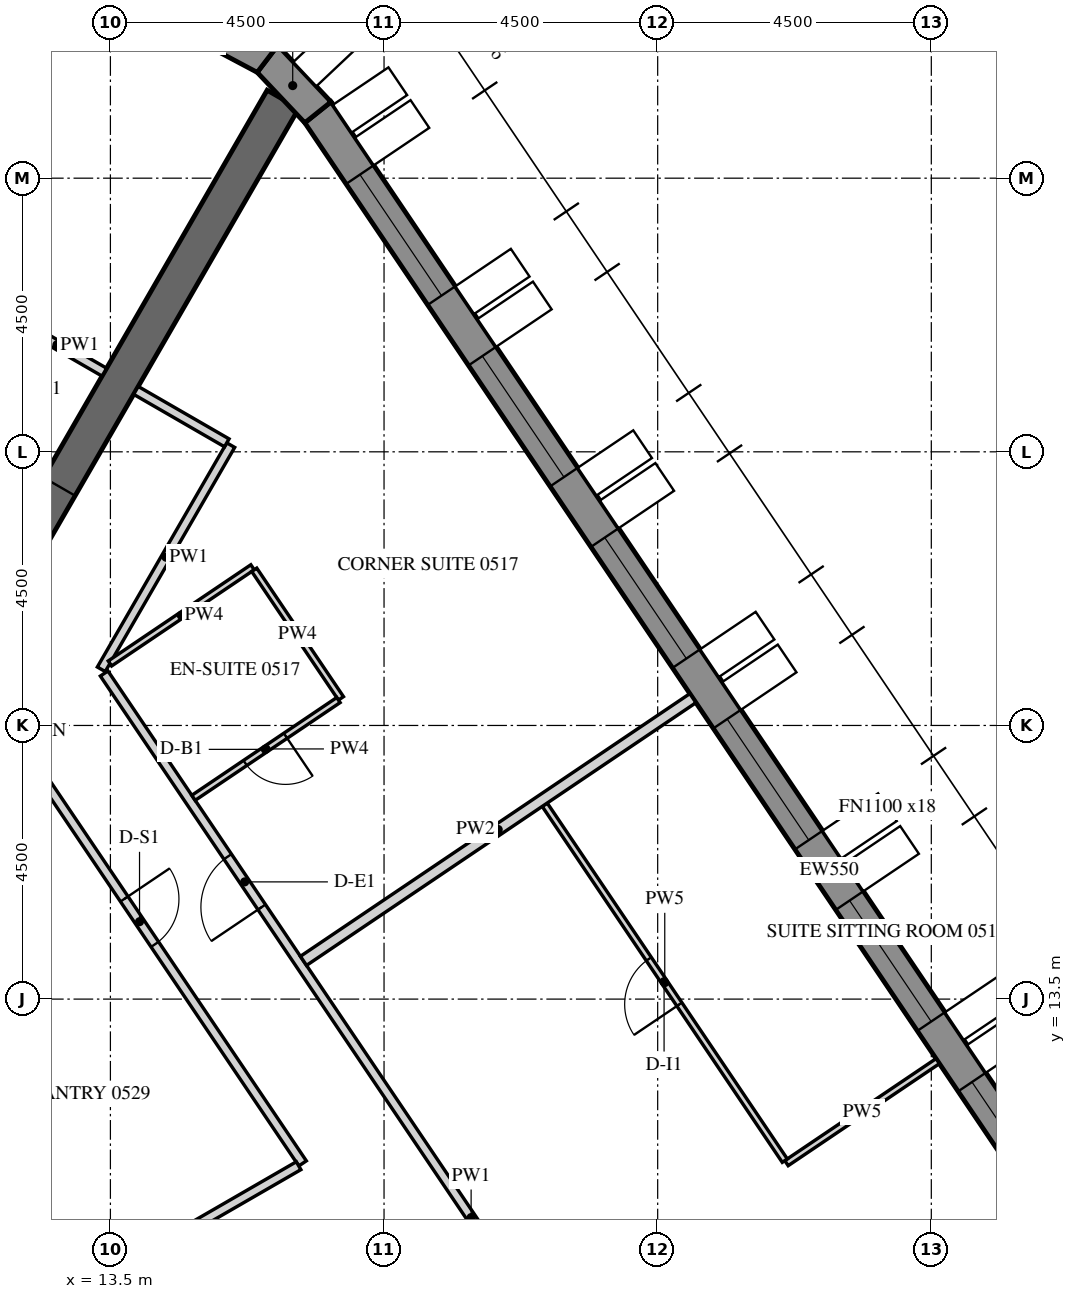
"""IFC4 building model, lengths in metres.
Left out: names, types, materials, properties, quantities, classifications, styles, units other than length and angle.
Written with IfcOpenShell. Run it as: python <this file> out.ifc"""

import sys

from ifc_helpers import new_model, si_unit, direction, frame, frame_2d, origin, place, context, subcontext, project, spatial, polyline, rectangle, outline, extrude, element, fill, save


model = new_model("IFC4")
c1 = context("Model", 3, precision=1e-05, world=origin(), true_north=direction((0.0, 1.0)))
c2 = subcontext(c1, "Body", "Model", "MODEL_VIEW")
j1 = project(units=[si_unit("LENGTHUNIT", "METRE"), si_unit("PLANEANGLEUNIT", "RADIAN")], contexts=[c1])
p1 = place(None, origin())
s1 = spatial("IfcSite", under=j1, at=p1, CompositionType="ELEMENT")
p2 = place(p1, origin())
s2 = spatial("IfcBuilding", under=s1, at=p2, CompositionType="ELEMENT")
p3 = place(p2, frame((0.0, 0.0, 80.4)))
s3 = spatial("IfcBuildingStorey", under=s2, at=p3, CompositionType="ELEMENT", Elevation=80.4)
p4 = place(p3, frame((33.728, 3.153, -0.15), z_axis=(0.0, 0.0, 1.0), x_axis=(-0.559192411416, 0.82903790445, 0.0)))
e1 = element("IfcWall", 1, at=p4, inside=s3, PredefinedType="SOLIDWALL", context=c2, shape_type="SweptSolid", body=[
    extrude(outline(polyline([(-0.026, -0.275), (30.093, -0.275), (30.048, 0.275), (0.026, 0.275), (-0.026, -0.275)])), origin(), (0.0, 0.0, 1.0), 3.9),
])
p5 = place(p4, frame((1.236, 0.0, 1.05)))
e2 = element("IfcOpeningElement", 2, at=p5, cuts=e1, PredefinedType="OPENING", context=c2, shape_type="SweptSolid", body=[
    extrude(rectangle(XDim=2.4, YDim=2.4, at=frame_2d((1.2, 1.2))), frame((0.0, 0.285, 0.0), z_axis=(0.0, -1.0, 0.0), x_axis=(1.0, 0.0, 0.0)), (0.0, 0.0, 1.0), 0.57),
])
p6 = place(p4, frame((4.835, 0.0, 1.05)))
e3 = element("IfcOpeningElement", 3, at=p6, cuts=e1, PredefinedType="OPENING", context=c2, shape_type="SweptSolid", body=[
    extrude(rectangle(XDim=2.4, YDim=2.4, at=frame_2d((1.2, 1.2))), frame((0.0, 0.285, 0.0), z_axis=(0.0, -1.0, 0.0), x_axis=(1.0, 0.0, 0.0)), (0.0, 0.0, 1.0), 0.57),
])
p7 = place(p4, frame((8.436, 0.0, 1.05)))
e4 = element("IfcOpeningElement", 4, at=p7, cuts=e1, PredefinedType="OPENING", context=c2, shape_type="SweptSolid", body=[
    extrude(rectangle(XDim=2.4, YDim=2.4, at=frame_2d((1.2, 1.2))), frame((0.0, 0.285, 0.0), z_axis=(0.0, -1.0, 0.0), x_axis=(1.0, 0.0, 0.0)), (0.0, 0.0, 1.0), 0.57),
])
p8 = place(p4, frame((12.035, 0.0, 1.05)))
e5 = element("IfcOpeningElement", 5, at=p8, cuts=e1, PredefinedType="OPENING", context=c2, shape_type="SweptSolid", body=[
    extrude(rectangle(XDim=2.4, YDim=2.4, at=frame_2d((1.2, 1.2))), frame((0.0, 0.285, 0.0), z_axis=(0.0, -1.0, 0.0), x_axis=(1.0, 0.0, 0.0)), (0.0, 0.0, 1.0), 0.57),
])
p9 = place(p4, frame((15.635, 0.0, 1.05)))
e6 = element("IfcOpeningElement", 6, at=p9, cuts=e1, PredefinedType="OPENING", context=c2, shape_type="SweptSolid", body=[
    extrude(rectangle(XDim=2.4, YDim=2.4, at=frame_2d((1.2, 1.2))), frame((0.0, 0.285, 0.0), z_axis=(0.0, -1.0, 0.0), x_axis=(1.0, 0.0, 0.0)), (0.0, 0.0, 1.0), 0.57),
])
p10 = place(p4, frame((19.236, 0.0, 1.05)))
e7 = element("IfcOpeningElement", 7, at=p10, cuts=e1, PredefinedType="OPENING", context=c2, shape_type="SweptSolid", body=[
    extrude(rectangle(XDim=2.4, YDim=2.4, at=frame_2d((1.2, 1.2))), frame((0.0, 0.285, 0.0), z_axis=(0.0, -1.0, 0.0), x_axis=(1.0, 0.0, 0.0)), (0.0, 0.0, 1.0), 0.57),
])
p11 = place(p4, frame((22.835, 0.0, 1.05)))
e8 = element("IfcOpeningElement", 8, at=p11, cuts=e1, PredefinedType="OPENING", context=c2, shape_type="SweptSolid", body=[
    extrude(rectangle(XDim=2.4, YDim=2.4, at=frame_2d((1.2, 1.2))), frame((0.0, 0.285, 0.0), z_axis=(0.0, -1.0, 0.0), x_axis=(1.0, 0.0, 0.0)), (0.0, 0.0, 1.0), 0.57),
])
p12 = place(p4, frame((26.436, 0.0, 1.05)))
e9 = element("IfcOpeningElement", 9, at=p12, cuts=e1, PredefinedType="OPENING", context=c2, shape_type="SweptSolid", body=[
    extrude(rectangle(XDim=2.4, YDim=2.4, at=frame_2d((1.2, 1.2))), frame((0.0, 0.285, 0.0), z_axis=(0.0, -1.0, 0.0), x_axis=(1.0, 0.0, 0.0)), (0.0, 0.0, 1.0), 0.57),
])
p13 = place(p3, frame((16.913, 28.083, -0.15), z_axis=(0.0, 0.0, 1.0), x_axis=(-0.686196220404, 0.727416488061, 0.0)))
e10 = element("IfcWall", 10, at=p13, inside=s3, PredefinedType="SOLIDWALL", context=c2, shape_type="SweptSolid", body=[
    extrude(outline(polyline([(-0.022, -0.275), (1.253, -0.275), (1.163, 0.275), (0.022, 0.275), (-0.022, -0.275)])), origin(), (0.0, 0.0, 1.0), 3.9),
])
p14 = place(p3, frame((16.083, 28.962, -0.15), z_axis=(0.0, 0.0, 1.0), x_axis=(-0.882995347911, 0.469381737574, 0.0)))
e11 = element("IfcWall", 11, at=p14, inside=s3, PredefinedType="SOLIDWALL", context=c2, shape_type="SweptSolid", body=[
    extrude(outline(polyline([(-0.045, -0.275), (1.253, -0.275), (1.163, 0.275), (0.045, 0.275), (-0.045, -0.275)])), origin(), (0.0, 0.0, 1.0), 3.9),
])
p15 = place(p3, frame((15.819, 0.0, -0.15), z_axis=(0.0, 0.0, 1.0), x_axis=(-0.499999880136, 0.866025472988, 0.0)))
e12 = element("IfcWall", 12, at=p15, inside=s3, PredefinedType="SHEAR", context=c2, shape_type="SweptSolid", body=[
    extrude(outline(polyline([(-0.173, -0.3), (15.993, -0.3), (15.646, 0.3), (0.173, 0.3), (-0.173, -0.3)])), origin(), (0.0, 0.0, 1.0), 3.9),
])
p16 = place(p15, frame((6.981, 0.0, 0.15)))
e13 = element("IfcOpeningElement", 13, at=p16, cuts=e12, PredefinedType="OPENING", context=c2, shape_type="SweptSolid", body=[
    extrude(rectangle(XDim=1.8, YDim=2.4, at=frame_2d((0.9, 1.2))), frame((0.0, 0.31, 0.0), z_axis=(0.0, -1.0, 0.0), x_axis=(1.0, 0.0, 0.0)), (0.0, 0.0, 1.0), 0.62),
])
p17 = place(p3, frame((8.083, 14.0, -0.15), z_axis=(0.0, 0.0, 1.0), x_axis=(0.499997680643, 0.866026742862, 0.0)))
e14 = element("IfcWall", 14, at=p17, inside=s3, PredefinedType="SHEAR", context=c2, shape_type="SweptSolid", body=[
    extrude(rectangle(XDim=16.509, YDim=0.6, at=frame_2d((8.254, 0.0))), origin(), (0.0, 0.0, 1.0), 3.9),
])
p18 = place(p17, frame((7.354, 0.0, 0.15)))
e15 = element("IfcOpeningElement", 15, at=p18, cuts=e14, PredefinedType="OPENING", context=c2, shape_type="SweptSolid", body=[
    extrude(rectangle(XDim=1.8, YDim=2.4, at=frame_2d((0.9, 1.2))), frame((0.0, 0.31, 0.0), z_axis=(0.0, -1.0, 0.0), x_axis=(1.0, 0.0, 0.0)), (0.0, 0.0, 1.0), 0.62),
])
p19 = place(p3, frame((13.4, 23.81, 0.0), z_axis=(0.0, 0.0, 1.0), x_axis=(-0.865989075817, 0.500062916607, 0.0)))
e16 = element("IfcWall", 16, at=p19, inside=s3, PredefinedType="PARTITIONING", context=c2, shape_type="SweptSolid", body=[
    extrude(rectangle(XDim=1.8, YDim=0.15, at=frame_2d((0.9, 0.0))), origin(), (0.0, 0.0, 1.0), 2.988),
])
p20 = place(p3, frame((25.467, 0.96, 0.0), z_axis=(0.0, 0.0, 1.0), x_axis=(-0.559192112521, 0.829038106057, 0.0)))
e17 = element("IfcWall", 17, at=p20, inside=s3, PredefinedType="PARTITIONING", context=c2, shape_type="SweptSolid", body=[
    extrude(rectangle(XDim=21.584, YDim=0.15, at=frame_2d((10.792, 0.0))), origin(), (0.0, 0.0, 1.0), 2.988),
])
p21 = place(p20, frame((0.184, 0.0, 0.0)))
e18 = element("IfcOpeningElement", 18, at=p21, cuts=e17, PredefinedType="OPENING", context=c2, shape_type="SweptSolid", body=[
    extrude(rectangle(XDim=1.0, YDim=2.1, at=frame_2d((0.5, 1.05))), frame((0.0, 0.085, 0.0), z_axis=(0.0, -1.0, 0.0), x_axis=(1.0, 0.0, 0.0)), (0.0, 0.0, 1.0), 0.17),
])
p22 = place(p20, frame((9.434, 0.0, 0.0)))
e19 = element("IfcOpeningElement", 19, at=p22, cuts=e17, PredefinedType="OPENING", context=c2, shape_type="SweptSolid", body=[
    extrude(rectangle(XDim=1.0, YDim=2.1, at=frame_2d((0.5, 1.05))), frame((0.0, 0.085, 0.0), z_axis=(0.0, -1.0, 0.0), x_axis=(1.0, 0.0, 0.0)), (0.0, 0.0, 1.0), 0.17),
])
p23 = place(p20, frame((16.951, 0.0, 0.0)))
e20 = element("IfcOpeningElement", 20, at=p23, cuts=e17, PredefinedType="OPENING", context=c2, shape_type="SweptSolid", body=[
    extrude(rectangle(XDim=1.0, YDim=2.1, at=frame_2d((0.5, 1.05))), frame((0.0, 0.085, 0.0), z_axis=(0.0, -1.0, 0.0), x_axis=(1.0, 0.0, 0.0)), (0.0, 0.0, 1.0), 0.17),
])
p24 = place(p3, frame((13.35, 18.924, 0.0), z_axis=(0.0, 0.0, 1.0), x_axis=(0.500000470374, 0.866025132214, 0.0)))
e21 = element("IfcWall", 21, at=p24, inside=s3, PredefinedType="PARTITIONING", context=c2, shape_type="SweptSolid", body=[
    extrude(rectangle(XDim=4.257, YDim=0.15, at=frame_2d((2.128, 0.0))), origin(), (0.0, 0.0, 1.0), 2.988),
])
p25 = place(p3, frame((15.414, 22.648, 0.0), z_axis=(0.0, 0.0, 1.0), x_axis=(-0.866074815912, 0.499914405916, 0.0)))
e22 = element("IfcWall", 22, at=p25, inside=s3, PredefinedType="PARTITIONING", context=c2, shape_type="SweptSolid", body=[
    extrude(rectangle(XDim=1.725, YDim=0.15, at=frame_2d((0.862, 0.0))), origin(), (0.0, 0.0, 1.0), 2.988),
])
p26 = place(p3, frame((11.298, 18.748, 0.0), z_axis=(0.0, 0.0, 1.0), x_axis=(0.559198234291, -0.829033976847, 0.0)))
e23 = element("IfcWall", 23, at=p26, inside=s3, PredefinedType="PARTITIONING", context=c2, shape_type="SweptSolid", body=[
    extrude(rectangle(XDim=9.59, YDim=0.15, at=frame_2d((4.795, 0.0))), origin(), (0.0, 0.0, 1.0), 2.988),
])
p27 = place(p26, frame((4.345, 0.0, 0.0)))
e24 = element("IfcOpeningElement", 24, at=p27, cuts=e23, PredefinedType="OPENING", context=c2, shape_type="SweptSolid", body=[
    extrude(rectangle(XDim=0.9, YDim=2.1, at=frame_2d((0.45, 1.05))), frame((0.0, 0.085, 0.0), z_axis=(0.0, -1.0, 0.0), x_axis=(1.0, 0.0, 0.0)), (0.0, 0.0, 1.0), 0.17),
])
p28 = place(p3, frame((16.595, 10.76, 0.0), z_axis=(0.0, 0.0, 1.0), x_axis=(-0.866019477104, -0.500010265171, 0.0)))
e25 = element("IfcWall", 25, at=p28, inside=s3, PredefinedType="PARTITIONING", context=c2, shape_type="SweptSolid", body=[
    extrude(rectangle(XDim=5.752, YDim=0.15, at=frame_2d((2.876, 0.0))), origin(), (0.0, 0.0, 1.0), 2.988),
])
p29 = place(p3, frame((27.105, 12.48, 0.0), z_axis=(0.0, 0.0, 1.0), x_axis=(-0.829008079006, -0.559236626968, 0.0)))
e26 = element("IfcWall", 26, at=p29, inside=s3, PredefinedType="PARTITIONING", context=c2, shape_type="SweptSolid", body=[
    extrude(rectangle(XDim=3.0, YDim=0.1, at=frame_2d((1.5, 0.0))), origin(), (0.0, 0.0, 1.0), 2.988),
])
p30 = place(p3, frame((24.59, 10.844, 0.0), z_axis=(0.0, 0.0, 1.0), x_axis=(-0.559177045947, 0.829048268369, 0.0)))
e27 = element("IfcWall", 27, at=p30, inside=s3, PredefinedType="PARTITIONING", context=c2, shape_type="SweptSolid", body=[
    extrude(rectangle(XDim=7.06, YDim=0.1, at=frame_2d((3.53, 0.0))), origin(), (0.0, 0.0, 1.0), 2.988),
])
p31 = place(p30, frame((3.1, 0.0, 0.0)))
e28 = element("IfcOpeningElement", 28, at=p31, cuts=e27, PredefinedType="OPENING", context=c2, shape_type="SweptSolid", body=[
    extrude(rectangle(XDim=0.9, YDim=2.1, at=frame_2d((0.45, 1.05))), frame((0.0, 0.06, 0.0), z_axis=(0.0, -1.0, 0.0), x_axis=(1.0, 0.0, 0.0)), (0.0, 0.0, 1.0), 0.12),
])
p32 = place(p3, frame((23.079, 18.449, 0.0), z_axis=(0.0, 0.0, 1.0), x_axis=(-0.82903328576, -0.559199258853, 0.0)))
e29 = element("IfcWall", 29, at=p32, inside=s3, PredefinedType="PARTITIONING", context=c2, shape_type="SweptSolid", body=[
    extrude(rectangle(XDim=7.725, YDim=0.18, at=frame_2d((3.863, 0.0))), origin(), (0.0, 0.0, 1.0), 2.988),
])
p33 = place(p3, frame((13.492, 19.019, 0.0), z_axis=(0.0, 0.0, 1.0), x_axis=(0.829037705426, 0.559192706481, 0.0)))
e30 = element("IfcWall", 30, at=p33, inside=s3, PredefinedType="PARTITIONING", context=c2, shape_type="SweptSolid", body=[
    extrude(rectangle(XDim=2.829, YDim=0.1, at=frame_2d((1.415, 0.0))), origin(), (0.0, 0.0, 1.0), 2.988),
])
p34 = place(p3, frame((15.865, 20.56, 0.0), z_axis=(0.0, 0.0, 1.0), x_axis=(0.559221247909, -0.829018453285, 0.0)))
e31 = element("IfcWall", 31, at=p34, inside=s3, PredefinedType="PARTITIONING", context=c2, shape_type="SweptSolid", body=[
    extrude(rectangle(XDim=2.55, YDim=0.1, at=frame_2d((1.275, 0.0))), origin(), (0.0, 0.0, 1.0), 2.988),
])
p35 = place(p3, frame((17.25, 18.418, 0.0), z_axis=(0.0, 0.0, 1.0), x_axis=(-0.82904649496, -0.559179675234, 0.0)))
e32 = element("IfcWall", 32, at=p35, inside=s3, PredefinedType="PARTITIONING", context=c2, shape_type="SweptSolid", body=[
    extrude(rectangle(XDim=2.875, YDim=0.1, at=frame_2d((1.438, 0.0))), origin(), (0.0, 0.0, 1.0), 2.988),
])
p36 = place(p35, frame((1.05, 0.0, 0.0)))
e33 = element("IfcOpeningElement", 33, at=p36, cuts=e32, PredefinedType="OPENING", context=c2, shape_type="SweptSolid", body=[
    extrude(rectangle(XDim=0.8, YDim=2.1, at=frame_2d((0.4, 1.05))), frame((0.0, 0.06, 0.0), z_axis=(0.0, -1.0, 0.0), x_axis=(1.0, 0.0, 0.0)), (0.0, 0.0, 1.0), 0.12),
])
p37 = place(p7, frame((0.0, 0.205, 0.0)))
e34 = element("IfcWindow", 34, at=p37, inside=s3, PartitioningType="DOUBLE_PANEL_VERTICAL", PredefinedType="WINDOW", context=c2, shape_type="SweptSolid", body=[
    extrude(rectangle(XDim=2.4, YDim=2.4, at=frame_2d((1.2, 1.2))), frame((0.0, 0.03, 0.0), z_axis=(0.0, -1.0, 0.0), x_axis=(1.0, 0.0, 0.0)), (0.0, 0.0, 1.0), 0.06),
])
fill(e4, e34)
p38 = place(p8, frame((0.0, 0.205, 0.0)))
e35 = element("IfcWindow", 35, at=p38, inside=s3, PartitioningType="DOUBLE_PANEL_VERTICAL", PredefinedType="WINDOW", context=c2, shape_type="SweptSolid", body=[
    extrude(rectangle(XDim=2.4, YDim=2.4, at=frame_2d((1.2, 1.2))), frame((0.0, 0.03, 0.0), z_axis=(0.0, -1.0, 0.0), x_axis=(1.0, 0.0, 0.0)), (0.0, 0.0, 1.0), 0.06),
])
fill(e5, e35)
p39 = place(p9, frame((0.0, 0.205, 0.0)))
e36 = element("IfcWindow", 36, at=p39, inside=s3, PartitioningType="DOUBLE_PANEL_VERTICAL", PredefinedType="WINDOW", context=c2, shape_type="SweptSolid", body=[
    extrude(rectangle(XDim=2.4, YDim=2.4, at=frame_2d((1.2, 1.2))), frame((0.0, 0.03, 0.0), z_axis=(0.0, -1.0, 0.0), x_axis=(1.0, 0.0, 0.0)), (0.0, 0.0, 1.0), 0.06),
])
fill(e6, e36)
p40 = place(p10, frame((0.0, 0.205, 0.0)))
e37 = element("IfcWindow", 37, at=p40, inside=s3, PartitioningType="DOUBLE_PANEL_VERTICAL", PredefinedType="WINDOW", context=c2, shape_type="SweptSolid", body=[
    extrude(rectangle(XDim=2.4, YDim=2.4, at=frame_2d((1.2, 1.2))), frame((0.0, 0.03, 0.0), z_axis=(0.0, -1.0, 0.0), x_axis=(1.0, 0.0, 0.0)), (0.0, 0.0, 1.0), 0.06),
])
fill(e7, e37)
p41 = place(p11, frame((0.0, 0.205, 0.0)))
e38 = element("IfcWindow", 38, at=p41, inside=s3, PartitioningType="DOUBLE_PANEL_VERTICAL", PredefinedType="WINDOW", context=c2, shape_type="SweptSolid", body=[
    extrude(rectangle(XDim=2.4, YDim=2.4, at=frame_2d((1.2, 1.2))), frame((0.0, 0.03, 0.0), z_axis=(0.0, -1.0, 0.0), x_axis=(1.0, 0.0, 0.0)), (0.0, 0.0, 1.0), 0.06),
])
fill(e8, e38)
p42 = place(p12, frame((0.0, 0.205, 0.0)))
e39 = element("IfcWindow", 39, at=p42, inside=s3, PartitioningType="DOUBLE_PANEL_VERTICAL", PredefinedType="WINDOW", context=c2, shape_type="SweptSolid", body=[
    extrude(rectangle(XDim=2.4, YDim=2.4, at=frame_2d((1.2, 1.2))), frame((0.0, 0.03, 0.0), z_axis=(0.0, -1.0, 0.0), x_axis=(1.0, 0.0, 0.0)), (0.0, 0.0, 1.0), 0.06),
])
fill(e9, e39)
p43 = place(p18, origin())
e40 = element("IfcDoor", 40, at=p43, inside=s3, OperationType="DOUBLE_DOOR_SINGLE_SWING", PredefinedType="DOOR", context=c2, shape_type="SweptSolid", body=[
    extrude(rectangle(XDim=1.8, YDim=2.4, at=frame_2d((0.9, 1.2))), frame((0.0, 0.025, 0.0), z_axis=(0.0, -1.0, 0.0), x_axis=(1.0, 0.0, 0.0)), (0.0, 0.0, 1.0), 0.05),
])
fill(e15, e40)
p44 = place(p31, origin())
e41 = element("IfcDoor", 41, at=p44, inside=s3, OperationType="SINGLE_SWING_RIGHT", PredefinedType="DOOR", context=c2, shape_type="SweptSolid", body=[
    extrude(rectangle(XDim=0.9, YDim=2.1, at=frame_2d((0.45, 1.05))), frame((0.0, 0.025, 0.0), z_axis=(0.0, -1.0, 0.0), x_axis=(1.0, 0.0, 0.0)), (0.0, 0.0, 1.0), 0.05),
])
fill(e28, e41)
p45 = place(p23, origin())
e42 = element("IfcDoor", 42, at=p45, inside=s3, OperationType="SINGLE_SWING_RIGHT", PredefinedType="DOOR", context=c2, shape_type="SweptSolid", body=[
    extrude(rectangle(XDim=1.0, YDim=2.1, at=frame_2d((0.5, 1.05))), frame((0.0, 0.025, 0.0), z_axis=(0.0, -1.0, 0.0), x_axis=(1.0, 0.0, 0.0)), (0.0, 0.0, 1.0), 0.05),
])
fill(e20, e42)
p46 = place(p36, origin())
e43 = element("IfcDoor", 43, at=p46, inside=s3, OperationType="SINGLE_SWING_LEFT", PredefinedType="DOOR", context=c2, shape_type="SweptSolid", body=[
    extrude(rectangle(XDim=0.8, YDim=2.1, at=frame_2d((0.4, 1.05))), frame((0.0, 0.025, 0.0), z_axis=(0.0, -1.0, 0.0), x_axis=(1.0, 0.0, 0.0)), (0.0, 0.0, 1.0), 0.05),
])
fill(e33, e43)
p47 = place(p27, origin())
e44 = element("IfcDoor", 44, at=p47, inside=s3, OperationType="SINGLE_SWING_RIGHT", PredefinedType="DOOR", context=c2, shape_type="SweptSolid", body=[
    extrude(rectangle(XDim=0.9, YDim=2.1, at=frame_2d((0.45, 1.05))), frame((0.0, 0.025, 0.0), z_axis=(0.0, -1.0, 0.0), x_axis=(1.0, 0.0, 0.0)), (0.0, 0.0, 1.0), 0.05),
])
fill(e24, e44)
save(model, sys.argv[1])
